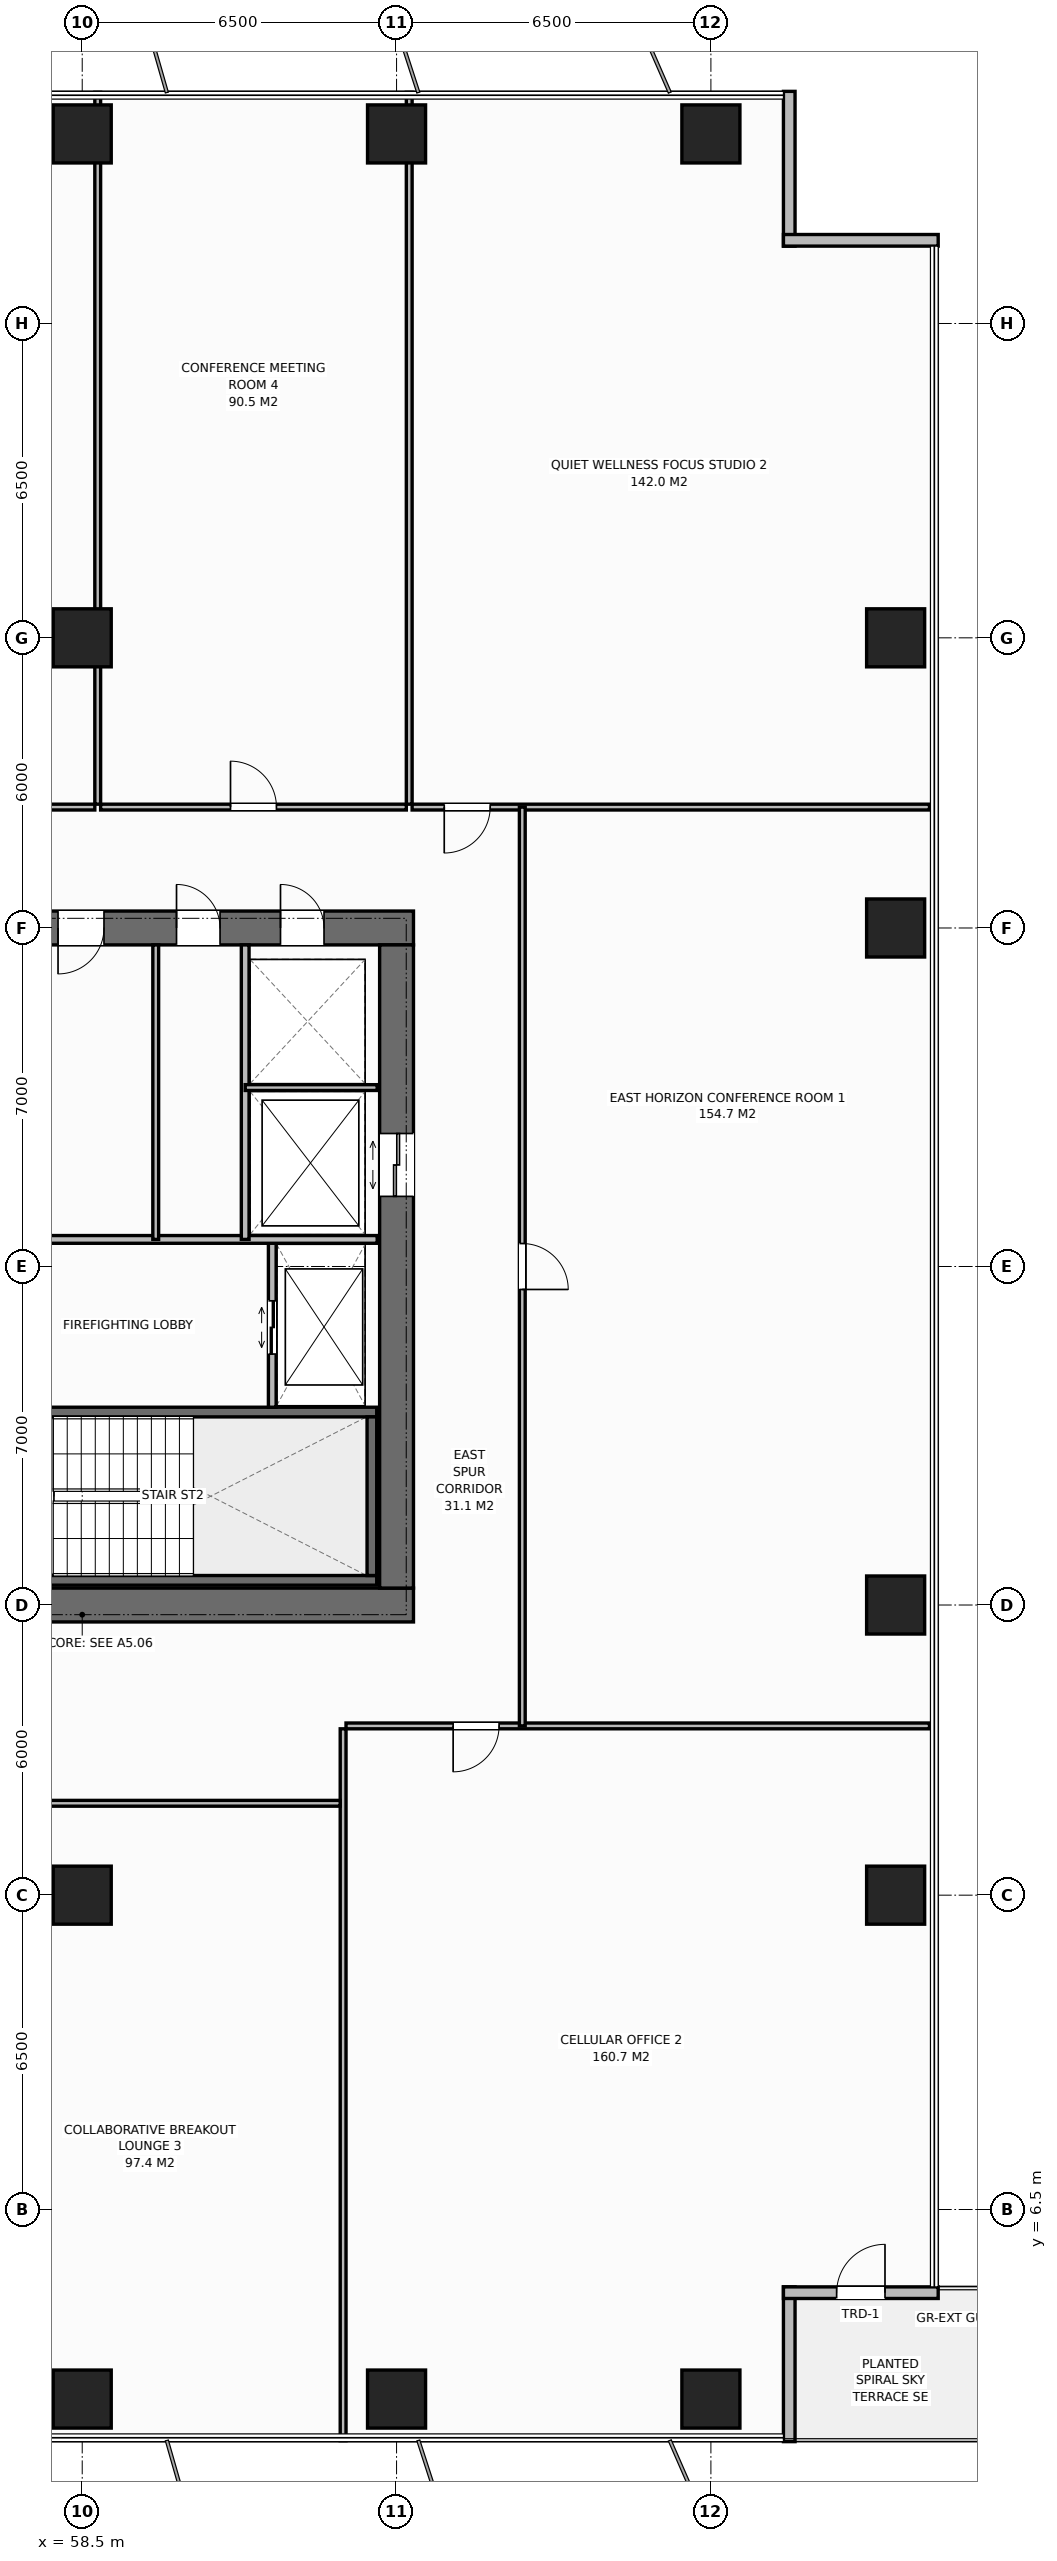
"""IFC4 building model, lengths in metres.
Left out: names, types, materials, properties, quantities, classifications, styles, units other than length and angle.
Written with IfcOpenShell. Run it as: python <this file> out.ifc"""

import sys

from ifc_helpers import new_model, si_unit, direction, frame, frame_2d, origin, origin_2d, place, context, subcontext, project, spatial, rectangle, extrude, element, fill, save


model = new_model("IFC4")
c1 = context("Model", 3, precision=1e-05, world=origin(), true_north=direction((0.0, 1.0)))
c2 = subcontext(c1, "Body", "Model", "MODEL_VIEW")
j1 = project(units=[si_unit("LENGTHUNIT", "METRE"), si_unit("PLANEANGLEUNIT", "RADIAN")], contexts=[c1])
p1 = place(None, origin())
s1 = spatial("IfcSite", under=j1, at=p1, CompositionType="ELEMENT")
p2 = place(p1, origin())
s2 = spatial("IfcBuilding", under=s1, at=p2, CompositionType="ELEMENT")
p3 = place(p2, frame((0.0, 0.0, 120.2)))
s3 = spatial("IfcBuildingStorey", under=s2, at=p3, CompositionType="ELEMENT", Elevation=120.2)
p4 = place(p3, frame((51.65, 19.0, 0.0), z_axis=(0.0, 0.0, 1.0), x_axis=(1.0, 0.0, 0.0)))
e1 = element("IfcWall", 1, at=p4, inside=s3, PredefinedType="SHEAR", context=c2, shape_type="SweptSolid", body=[
    extrude(rectangle(XDim=13.7, YDim=0.7, at=frame_2d((6.85, 0.0))), origin(), (0.0, 0.0, 1.0), 3.8),
])
p5 = place(p4, frame((3.07, 0.0, 0.0)))
e2 = element("IfcOpeningElement", 2, at=p5, cuts=e1, PredefinedType="OPENING", context=c2, shape_type="SweptSolid", body=[
    extrude(rectangle(XDim=1.4, YDim=2.2, at=frame_2d((0.7, 1.1))), frame((0.0, 0.36, 0.0), z_axis=(0.0, -1.0, 0.0), x_axis=(1.0, 0.0, 0.0)), (0.0, 0.0, 1.0), 0.72),
])
p6 = place(p3, frame((51.65, 33.0, 0.0), z_axis=(0.0, 0.0, 1.0), x_axis=(1.0, 0.0, 0.0)))
e3 = element("IfcWall", 3, at=p6, inside=s3, PredefinedType="SHEAR", context=c2, shape_type="SweptSolid", body=[
    extrude(rectangle(XDim=13.7, YDim=0.7, at=frame_2d((6.85, 0.0))), origin(), (0.0, 0.0, 1.0), 3.8),
])
p7 = place(p6, frame((3.07, 0.0, 0.0)))
e4 = element("IfcOpeningElement", 4, at=p7, cuts=e3, PredefinedType="OPENING", context=c2, shape_type="SweptSolid", body=[
    extrude(rectangle(XDim=1.4, YDim=2.2, at=frame_2d((0.7, 1.1))), frame((0.0, 0.36, 0.0), z_axis=(0.0, -1.0, 0.0), x_axis=(1.0, 0.0, 0.0)), (0.0, 0.0, 1.0), 0.72),
])
p8 = place(p6, frame((10.95, 0.0, 0.0)))
e5 = element("IfcOpeningElement", 5, at=p8, cuts=e3, PredefinedType="OPENING", context=c2, shape_type="SweptSolid", body=[
    extrude(rectangle(XDim=0.9, YDim=2.15, at=frame_2d((0.45, 1.075))), frame((0.0, 0.36, 0.0), z_axis=(0.0, -1.0, 0.0), x_axis=(1.0, 0.0, 0.0)), (0.0, 0.0, 1.0), 0.72),
])
p9 = place(p6, frame((6.35, 0.0, 0.0)))
e6 = element("IfcOpeningElement", 6, at=p9, cuts=e3, PredefinedType="OPENING", context=c2, shape_type="SweptSolid", body=[
    extrude(rectangle(XDim=0.95, YDim=2.15, at=frame_2d((0.475, 1.075))), frame((0.0, 0.36, 0.0), z_axis=(0.0, -1.0, 0.0), x_axis=(1.0, 0.0, 0.0)), (0.0, 0.0, 1.0), 0.72),
])
p10 = place(p6, frame((8.8, 0.0, 0.0)))
e7 = element("IfcOpeningElement", 7, at=p10, cuts=e3, PredefinedType="OPENING", context=c2, shape_type="SweptSolid", body=[
    extrude(rectangle(XDim=0.9, YDim=2.15, at=frame_2d((0.45, 1.075))), frame((0.0, 0.36, 0.0), z_axis=(0.0, -1.0, 0.0), x_axis=(1.0, 0.0, 0.0)), (0.0, 0.0, 1.0), 0.72),
])
p11 = place(p3, frame((65.0, 19.35, 0.0), z_axis=(0.0, 0.0, 1.0), x_axis=(0.0, 1.0, 0.0)))
e8 = element("IfcWall", 8, at=p11, inside=s3, PredefinedType="SHEAR", context=c2, shape_type="SweptSolid", body=[
    extrude(rectangle(XDim=13.3, YDim=0.7, at=frame_2d((6.65, 0.0))), origin(), (0.0, 0.0, 1.0), 3.8),
])
p12 = place(p11, frame((8.1, 0.0, 0.0)))
e9 = element("IfcOpeningElement", 9, at=p12, cuts=e8, PredefinedType="OPENING", context=c2, shape_type="SweptSolid", body=[
    extrude(rectangle(XDim=1.3, YDim=2.2, at=frame_2d((0.65, 1.1))), frame((0.0, 0.36, 0.0), z_axis=(0.0, -1.0, 0.0), x_axis=(1.0, 0.0, 0.0)), (0.0, 0.0, 1.0), 0.72),
])
p13 = place(p3, frame((56.16, 19.51, 0.0), z_axis=(0.0, 0.0, 1.0), x_axis=(1.0, 0.0, 0.0)))
e10 = element("IfcWall", 10, at=p13, inside=s3, PredefinedType="SHEAR", context=c2, shape_type="SweptSolid", body=[
    extrude(rectangle(XDim=8.43, YDim=0.2, at=frame_2d((4.215, 0.0))), origin(), (0.0, 0.0, 1.0), 3.8),
])
p14 = place(p3, frame((56.16, 22.99, 0.0), z_axis=(0.0, 0.0, 1.0), x_axis=(1.0, 0.0, 0.0)))
e11 = element("IfcWall", 11, at=p14, inside=s3, PredefinedType="SHEAR", context=c2, shape_type="SweptSolid", body=[
    extrude(rectangle(XDim=8.43, YDim=0.2, at=frame_2d((4.215, 0.0))), origin(), (0.0, 0.0, 1.0), 3.8),
])
p15 = place(p14, frame((0.45, 0.0, 0.0)))
e12 = element("IfcOpeningElement", 12, at=p15, cuts=e11, PredefinedType="OPENING", context=c2, shape_type="SweptSolid", body=[
    extrude(rectangle(XDim=1.0, YDim=2.15, at=frame_2d((0.5, 1.075))), frame((0.0, 0.11, 0.0), z_axis=(0.0, -1.0, 0.0), x_axis=(1.0, 0.0, 0.0)), (0.0, 0.0, 1.0), 0.22),
])
p16 = place(p3, frame((64.49, 19.61, 0.0), z_axis=(0.0, 0.0, 1.0), x_axis=(0.0, 1.0, 0.0)))
e13 = element("IfcWall", 13, at=p16, inside=s3, PredefinedType="SHEAR", context=c2, shape_type="SweptSolid", body=[
    extrude(rectangle(XDim=3.28, YDim=0.2, at=frame_2d((1.64, 0.0))), origin(), (0.0, 0.0, 1.0), 3.8),
])
for number, where, z_axis, x_axis in (
    (14, (58.5, 13.0, 0.0), (0.0, 0.0, 1.0), (1.0, 0.0, 0.0)),
    (15, (58.5, 39.0, 0.0), (0.0, 0.0, 1.0), (1.0, 0.0, 0.0)),
    (16, (58.5, 2.58, 0.0), (0.0, 0.0, 1.0), (1.0, 0.0, 0.0)),
    (17, (58.5, 49.42, 0.0), (0.0, 0.0, 1.0), (1.0, 0.0, 0.0)),
    (18, (65.0, 2.58, 0.0), (0.0, 0.0, 1.0), (1.0, 0.0, 0.0)),
    (19, (65.0, 49.42, 0.0), (0.0, 0.0, 1.0), (1.0, 0.0, 0.0)),
    (20, (71.5, 2.58, 0.0), (0.0, 0.0, 1.0), (1.0, 0.0, 0.0)),
    (21, (71.5, 49.42, 0.0), (0.0, 0.0, 1.0), (1.0, 0.0, 0.0)),
    (22, (75.32, 13.0, 0.0), (0.0, 0.0, 1.0), (1.0, 0.0, 0.0)),
    (23, (75.32, 19.0, 0.0), (0.0, 0.0, 1.0), (1.0, 0.0, 0.0)),
    (24, (75.32, 33.0, 0.0), (0.0, 0.0, 1.0), (1.0, 0.0, 0.0)),
    (25, (75.32, 39.0, 0.0), (0.0, 0.0, 1.0), (1.0, 0.0, 0.0)),
):
    element("IfcColumn", number, at=place(p3, frame(where, z_axis=z_axis, x_axis=x_axis)), inside=s3, PredefinedType="COLUMN", context=c2, shape_type="SweptSolid", body=[
        extrude(rectangle(XDim=1.2, YDim=1.2, at=origin_2d()), origin(), (0.0, 0.0, 1.0), 3.8),
    ])
for number, where, z_axis, x_axis in (
    (26, (73.12, 50.3, 0.0), (0.0, 0.0, 1.0), (0.0, -1.0, 0.0)),
    (27, (73.0, 47.22, 0.0), (0.0, 0.0, 1.0), (1.0, 0.0, 0.0)),
    (28, (73.12, 4.9, 0.0), (0.0, 0.0, 1.0), (0.0, -1.0, 0.0)),
):
    element("IfcWall", number, at=place(p3, frame(where, z_axis=z_axis, x_axis=x_axis)), inside=s3, PredefinedType="STANDARD", context=c2, shape_type="SweptSolid", body=[
        extrude(rectangle(XDim=3.2, YDim=0.24, at=frame_2d((1.6, 0.0))), origin(), (0.0, 0.0, 1.0), 3.565),
    ])
p17 = place(p3, frame((76.2, 4.78, 0.0), z_axis=(0.0, 0.0, 1.0), x_axis=(-1.0, 0.0, 0.0)))
e29 = element("IfcWall", 29, at=p17, inside=s3, PredefinedType="STANDARD", context=c2, shape_type="SweptSolid", body=[
    extrude(rectangle(XDim=3.2, YDim=0.24, at=frame_2d((1.6, 0.0))), origin(), (0.0, 0.0, 1.0), 3.565),
])
p18 = place(p17, frame((1.1, 0.0, 0.0)))
e30 = element("IfcOpeningElement", 30, at=p18, cuts=e29, PredefinedType="OPENING", context=c2, shape_type="SweptSolid", body=[
    extrude(rectangle(XDim=1.0, YDim=2.2, at=frame_2d((0.5, 1.1))), frame((0.0, 0.13, 0.0), z_axis=(0.0, -1.0, 0.0), x_axis=(1.0, 0.0, 0.0)), (0.0, 0.0, 1.0), 0.26),
])
p19 = place(p3, frame((62.43, 23.09, 0.0), z_axis=(0.0, 0.0, 1.0), x_axis=(0.0, 1.0, 0.0)))
e31 = element("IfcWall", 31, at=p19, inside=s3, PredefinedType="STANDARD", context=c2, shape_type="SweptSolid", body=[
    extrude(rectangle(XDim=3.47, YDim=0.16, at=frame_2d((1.735, 0.0))), origin(), (0.0, 0.0, 1.0), 3.565),
])
p20 = place(p19, frame((1.1, 0.0, 0.0)))
e32 = element("IfcOpeningElement", 32, at=p20, cuts=e31, PredefinedType="OPENING", context=c2, shape_type="SweptSolid", body=[
    extrude(rectangle(XDim=1.1, YDim=2.2, at=frame_2d((0.55, 1.1))), frame((0.0, 0.09, 0.0), z_axis=(0.0, -1.0, 0.0), x_axis=(1.0, 0.0, 0.0)), (0.0, 0.0, 1.0), 0.18),
])
p21 = place(p3, frame((56.26, 26.56, 0.0), z_axis=(0.0, 0.0, 1.0), x_axis=(1.0, 0.0, 0.0)))
e33 = element("IfcWall", 33, at=p21, inside=s3, PredefinedType="STANDARD", context=c2, shape_type="SweptSolid", body=[
    extrude(rectangle(XDim=8.34, YDim=0.16, at=frame_2d((4.17, 0.0))), origin(), (0.0, 0.0, 1.0), 3.565),
])
p22 = place(p3, frame((61.87, 26.56, 0.0), z_axis=(0.0, 0.0, 1.0), x_axis=(0.0, 1.0, 0.0)))
e34 = element("IfcWall", 34, at=p22, inside=s3, PredefinedType="STANDARD", context=c2, shape_type="SweptSolid", body=[
    extrude(rectangle(XDim=6.09, YDim=0.16, at=frame_2d((3.045, 0.0))), origin(), (0.0, 0.0, 1.0), 3.565),
])
p23 = place(p3, frame((61.87, 29.7, 0.0), z_axis=(0.0, 0.0, 1.0), x_axis=(1.0, 0.0, 0.0)))
e35 = element("IfcWall", 35, at=p23, inside=s3, PredefinedType="PARTITIONING", context=c2, shape_type="SweptSolid", body=[
    extrude(rectangle(XDim=2.73, YDim=0.12, at=frame_2d((1.365, 0.0))), origin(), (0.0, 0.0, 1.0), 3.565),
])
p24 = place(p3, frame((60.02, 26.56, 0.0), z_axis=(0.0, 0.0, 1.0), x_axis=(0.0, 1.0, 0.0)))
e36 = element("IfcWall", 36, at=p24, inside=s3, PredefinedType="PARTITIONING", context=c2, shape_type="SweptSolid", body=[
    extrude(rectangle(XDim=6.09, YDim=0.12, at=frame_2d((3.045, 0.0))), origin(), (0.0, 0.0, 1.0), 3.565),
])
p25 = place(p3, frame((58.821, 35.56, 0.0), z_axis=(0.0, 0.0, 1.0), x_axis=(0.0, 1.0, 0.0)))
e37 = element("IfcWall", 37, at=p25, inside=s3, PredefinedType="PARTITIONING", context=c2, shape_type="SweptSolid", body=[
    extrude(rectangle(XDim=14.72, YDim=0.12, at=frame_2d((7.36, 0.0))), origin(), (0.0, 0.0, 1.0), 3.565),
])
p26 = place(p3, frame((49.559, 35.5, 0.0), z_axis=(0.0, 0.0, 1.0), x_axis=(1.0, 0.0, 0.0)))
e38 = element("IfcWall", 38, at=p26, inside=s3, PredefinedType="PARTITIONING", context=c2, shape_type="SweptSolid", body=[
    extrude(rectangle(XDim=9.202, YDim=0.12, at=frame_2d((4.601, 0.0))), origin(), (0.0, 0.0, 1.0), 3.565),
])
p27 = place(p26, frame((4.126, 0.0, 0.0)))
e39 = element("IfcOpeningElement", 39, at=p27, cuts=e38, PredefinedType="OPENING", context=c2, shape_type="SweptSolid", body=[
    extrude(rectangle(XDim=0.95, YDim=2.15, at=frame_2d((0.475, 1.075))), frame((0.0, 0.07, 0.0), z_axis=(0.0, -1.0, 0.0), x_axis=(1.0, 0.0, 0.0)), (0.0, 0.0, 1.0), 0.14),
])
p28 = place(p3, frame((65.262, 35.56, 0.0), z_axis=(0.0, 0.0, 1.0), x_axis=(0.0, 1.0, 0.0)))
e40 = element("IfcWall", 40, at=p28, inside=s3, PredefinedType="PARTITIONING", context=c2, shape_type="SweptSolid", body=[
    extrude(rectangle(XDim=14.72, YDim=0.12, at=frame_2d((7.36, 0.0))), origin(), (0.0, 0.0, 1.0), 3.565),
])
p29 = place(p3, frame((58.881, 35.5, 0.0), z_axis=(0.0, 0.0, 1.0), x_axis=(1.0, 0.0, 0.0)))
e41 = element("IfcWall", 41, at=p29, inside=s3, PredefinedType="PARTITIONING", context=c2, shape_type="SweptSolid", body=[
    extrude(rectangle(XDim=6.321, YDim=0.12, at=frame_2d((3.161, 0.0))), origin(), (0.0, 0.0, 1.0), 3.565),
])
p30 = place(p29, frame((2.686, 0.0, 0.0)))
e42 = element("IfcOpeningElement", 42, at=p30, cuts=e41, PredefinedType="OPENING", context=c2, shape_type="SweptSolid", body=[
    extrude(rectangle(XDim=0.95, YDim=2.15, at=frame_2d((0.475, 1.075))), frame((0.0, 0.07, 0.0), z_axis=(0.0, -1.0, 0.0), x_axis=(1.0, 0.0, 0.0)), (0.0, 0.0, 1.0), 0.14),
])
p31 = place(p3, frame((65.322, 35.5, 0.0), z_axis=(0.0, 0.0, 1.0), x_axis=(1.0, 0.0, 0.0)))
e43 = element("IfcWall", 43, at=p31, inside=s3, PredefinedType="PARTITIONING", context=c2, shape_type="SweptSolid", body=[
    extrude(rectangle(XDim=10.698, YDim=0.12, at=frame_2d((5.349, 0.0))), origin(), (0.0, 0.0, 1.0), 3.565),
])
p32 = place(p31, frame((0.664, 0.0, 0.0)))
e44 = element("IfcOpeningElement", 44, at=p32, cuts=e43, PredefinedType="OPENING", context=c2, shape_type="SweptSolid", body=[
    extrude(rectangle(XDim=0.95, YDim=2.15, at=frame_2d((0.475, 1.075))), frame((0.0, 0.07, 0.0), z_axis=(0.0, -1.0, 0.0), x_axis=(1.0, 0.0, 0.0)), (0.0, 0.0, 1.0), 0.14),
])
p33 = place(p3, frame((63.895, 1.72, 0.0), z_axis=(0.0, 0.0, 1.0), x_axis=(0.0, 1.0, 0.0)))
e45 = element("IfcWall", 45, at=p33, inside=s3, PredefinedType="PARTITIONING", context=c2, shape_type="SweptSolid", body=[
    extrude(rectangle(XDim=14.72, YDim=0.12, at=frame_2d((7.36, 0.0))), origin(), (0.0, 0.0, 1.0), 3.565),
])
p34 = place(p3, frame((55.97, 14.9, 0.0), z_axis=(0.0, 0.0, 1.0), x_axis=(1.0, 0.0, 0.0)))
e46 = element("IfcWall", 46, at=p34, inside=s3, PredefinedType="PARTITIONING", context=c2, shape_type="SweptSolid", body=[
    extrude(rectangle(XDim=7.865, YDim=0.12, at=frame_2d((3.933, 0.0))), origin(), (0.0, 0.0, 1.0), 3.565),
])
p35 = place(p34, frame((0.48, 0.0, 0.0)))
e47 = element("IfcOpeningElement", 47, at=p35, cuts=e46, PredefinedType="OPENING", context=c2, shape_type="SweptSolid", body=[
    extrude(rectangle(XDim=0.95, YDim=2.15, at=frame_2d((0.475, 1.075))), frame((0.0, 0.07, 0.0), z_axis=(0.0, -1.0, 0.0), x_axis=(1.0, 0.0, 0.0)), (0.0, 0.0, 1.0), 0.14),
])
p36 = place(p3, frame((63.955, 16.5, 0.0), z_axis=(0.0, 0.0, 1.0), x_axis=(1.0, 0.0, 0.0)))
e48 = element("IfcWall", 48, at=p36, inside=s3, PredefinedType="PARTITIONING", context=c2, shape_type="SweptSolid", body=[
    extrude(rectangle(XDim=12.065, YDim=0.12, at=frame_2d((6.033, 0.0))), origin(), (0.0, 0.0, 1.0), 3.565),
])
p37 = place(p36, frame((2.215, 0.0, 0.0)))
e49 = element("IfcOpeningElement", 49, at=p37, cuts=e48, PredefinedType="OPENING", context=c2, shape_type="SweptSolid", body=[
    extrude(rectangle(XDim=0.95, YDim=2.15, at=frame_2d((0.475, 1.075))), frame((0.0, 0.07, 0.0), z_axis=(0.0, -1.0, 0.0), x_axis=(1.0, 0.0, 0.0)), (0.0, 0.0, 1.0), 0.14),
])
p38 = place(p3, frame((67.6, 16.5, 0.0), z_axis=(0.0, 0.0, 1.0), x_axis=(0.0, 1.0, 0.0)))
e50 = element("IfcWall", 50, at=p38, inside=s3, PredefinedType="PARTITIONING", context=c2, shape_type="SweptSolid", body=[
    extrude(rectangle(XDim=19.0, YDim=0.12, at=frame_2d((9.5, 0.0))), origin(), (0.0, 0.0, 1.0), 3.565),
])
p39 = place(p38, frame((9.025, 0.0, 0.0)))
e51 = element("IfcOpeningElement", 51, at=p39, cuts=e50, PredefinedType="OPENING", context=c2, shape_type="SweptSolid", body=[
    extrude(rectangle(XDim=0.95, YDim=2.15, at=frame_2d((0.475, 1.075))), frame((0.0, 0.07, 0.0), z_axis=(0.0, -1.0, 0.0), x_axis=(1.0, 0.0, 0.0)), (0.0, 0.0, 1.0), 0.14),
])
p40 = place(p18, origin())
e52 = element("IfcDoor", 52, at=p40, inside=s3, OperationType="SINGLE_SWING_RIGHT", PredefinedType="DOOR", context=c2, shape_type="SweptSolid", body=[
    extrude(rectangle(XDim=1.0, YDim=2.2, at=frame_2d((0.5, 1.1))), frame((0.0, 0.025, 0.0), z_axis=(0.0, -1.0, 0.0), x_axis=(1.0, 0.0, 0.0)), (0.0, 0.0, 1.0), 0.05),
])
fill(e30, e52)
p41 = place(p20, origin())
e53 = element("IfcDoor", 53, at=p41, inside=s3, OperationType="DOUBLE_DOOR_SLIDING", PredefinedType="DOOR", context=c2, shape_type="SweptSolid", body=[
    extrude(rectangle(XDim=1.1, YDim=2.2, at=frame_2d((0.55, 1.1))), frame((0.0, 0.025, 0.0), z_axis=(0.0, -1.0, 0.0), x_axis=(1.0, 0.0, 0.0)), (0.0, 0.0, 1.0), 0.05),
])
fill(e32, e53)
p42 = place(p12, origin())
e54 = element("IfcDoor", 54, at=p42, inside=s3, OperationType="DOUBLE_DOOR_SLIDING", PredefinedType="DOOR", context=c2, shape_type="SweptSolid", body=[
    extrude(rectangle(XDim=1.3, YDim=2.2, at=frame_2d((0.65, 1.1))), frame((0.0, 0.025, 0.0), z_axis=(0.0, -1.0, 0.0), x_axis=(1.0, 0.0, 0.0)), (0.0, 0.0, 1.0), 0.05),
])
fill(e9, e54)
p43 = place(p8, origin())
e55 = element("IfcDoor", 55, at=p43, inside=s3, OperationType="SINGLE_SWING_LEFT", PredefinedType="DOOR", context=c2, shape_type="SweptSolid", body=[
    extrude(rectangle(XDim=0.9, YDim=2.15, at=frame_2d((0.45, 1.075))), frame((0.0, -0.075, 0.0), z_axis=(0.0, -1.0, 0.0), x_axis=(1.0, 0.0, 0.0)), (0.0, 0.0, 1.0), 0.05),
])
fill(e5, e55)
p44 = place(p9, origin())
e56 = element("IfcDoor", 56, at=p44, inside=s3, OperationType="SINGLE_SWING_RIGHT", PredefinedType="DOOR", context=c2, shape_type="SweptSolid", body=[
    extrude(rectangle(XDim=0.95, YDim=2.15, at=frame_2d((0.475, 1.075))), frame((0.0, -0.075, 0.0), z_axis=(0.0, -1.0, 0.0), x_axis=(1.0, 0.0, 0.0)), (0.0, 0.0, 1.0), 0.05),
])
fill(e6, e56)
p45 = place(p10, origin())
e57 = element("IfcDoor", 57, at=p45, inside=s3, OperationType="SINGLE_SWING_LEFT", PredefinedType="DOOR", context=c2, shape_type="SweptSolid", body=[
    extrude(rectangle(XDim=0.9, YDim=2.15, at=frame_2d((0.45, 1.075))), frame((0.0, -0.075, 0.0), z_axis=(0.0, -1.0, 0.0), x_axis=(1.0, 0.0, 0.0)), (0.0, 0.0, 1.0), 0.05),
])
fill(e7, e57)
p46 = place(p30, origin())
e58 = element("IfcDoor", 58, at=p46, inside=s3, OperationType="SINGLE_SWING_LEFT", PredefinedType="DOOR", context=c2, shape_type="SweptSolid", body=[
    extrude(rectangle(XDim=0.95, YDim=2.15, at=frame_2d((0.475, 1.075))), frame((0.0, 0.025, 0.0), z_axis=(0.0, -1.0, 0.0), x_axis=(1.0, 0.0, 0.0)), (0.0, 0.0, 1.0), 0.05),
])
fill(e42, e58)
p47 = place(p32, origin())
e59 = element("IfcDoor", 59, at=p47, inside=s3, OperationType="SINGLE_SWING_RIGHT", PredefinedType="DOOR", context=c2, shape_type="SweptSolid", body=[
    extrude(rectangle(XDim=0.95, YDim=2.15, at=frame_2d((0.475, 1.075))), frame((0.0, 0.025, 0.0), z_axis=(0.0, -1.0, 0.0), x_axis=(1.0, 0.0, 0.0)), (0.0, 0.0, 1.0), 0.05),
])
fill(e44, e59)
p48 = place(p37, origin())
e60 = element("IfcDoor", 60, at=p48, inside=s3, OperationType="SINGLE_SWING_RIGHT", PredefinedType="DOOR", context=c2, shape_type="SweptSolid", body=[
    extrude(rectangle(XDim=0.95, YDim=2.15, at=frame_2d((0.475, 1.075))), frame((0.0, 0.025, 0.0), z_axis=(0.0, -1.0, 0.0), x_axis=(1.0, 0.0, 0.0)), (0.0, 0.0, 1.0), 0.05),
])
fill(e49, e60)
p49 = place(p39, origin())
e61 = element("IfcDoor", 61, at=p49, inside=s3, OperationType="SINGLE_SWING_RIGHT", PredefinedType="DOOR", context=c2, shape_type="SweptSolid", body=[
    extrude(rectangle(XDim=0.95, YDim=2.15, at=frame_2d((0.475, 1.075))), frame((0.0, 0.025, 0.0), z_axis=(0.0, -1.0, 0.0), x_axis=(1.0, 0.0, 0.0)), (0.0, 0.0, 1.0), 0.05),
])
fill(e51, e61)
save(model, sys.argv[1])
